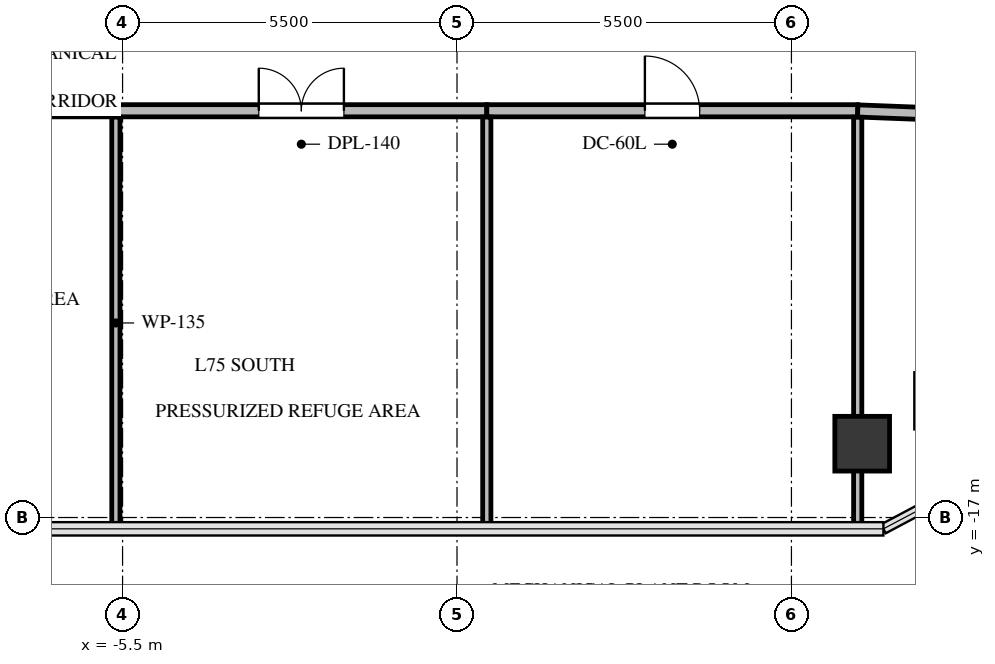
"""IFC4 building model, lengths in metres.
Left out: names, types, materials, properties, quantities, classifications, styles, units other than length and angle.
Written with IfcOpenShell. Run it as: python <this file> out.ifc"""

import sys

from ifc_helpers import new_model, si_unit, direction, frame, frame_2d, origin, origin_2d, place, context, subcontext, project, spatial, rectangle, extrude, source, transform, mapped, element, fill, save


model = new_model("IFC4")
c1 = context("Model", 3, precision=1e-05, world=origin(), true_north=direction((0.0, 1.0)))
c2 = subcontext(c1, "Body", "Model", "MODEL_VIEW")
j1 = project(units=[si_unit("LENGTHUNIT", "METRE"), si_unit("PLANEANGLEUNIT", "RADIAN")], contexts=[c1])
p1 = place(None, origin())
s1 = spatial("IfcSite", under=j1, at=p1, CompositionType="ELEMENT")
p2 = place(p1, origin())
s2 = spatial("IfcBuilding", under=s1, at=p2, CompositionType="ELEMENT")
p3 = place(p2, frame((0.0, 0.0, 268.3)))
s3 = spatial("IfcBuildingStorey", under=s2, at=p3, CompositionType="ELEMENT", Elevation=268.3)
m1 = source(origin(), c2, "Body", "SweptSolid", [
    extrude(rectangle(XDim=0.9, YDim=0.9, at=origin_2d()), origin(), (0.0, 0.0, 1.0), 4.05),
])
for number, where, z_axis, x_axis in (
    (1, (7.991, -15.081, -0.3), (0.0, 0.0, 1.0), (1.0, 0.0, 0.0)),
    (2, (6.664, -15.786, -0.3), (0.0, 0.0, 1.0), (1.0, 0.0, 0.0)),
):
    element("IfcColumn", number, at=place(p3, frame(where, z_axis=z_axis, x_axis=x_axis)), inside=s3, PredefinedType="COLUMN", context=c2, shape_type="MappedRepresentation", body=[
        mapped(m1, transform((0.0, 0.0, 0.0), x_axis=(1.0, 0.0, 0.0), y_axis=(0.0, 1.0, 0.0), z_axis=(0.0, 0.0, 1.0), scale=1.0)),
    ])
p4 = place(p3, frame((-12.39, -10.31, 0.0), z_axis=(0.0, 0.0, 1.0), x_axis=(1.0, 0.0, 0.0)))
e3 = element("IfcWall", 3, at=p4, inside=s3, PredefinedType="SOLIDWALL", context=c2, shape_type="SweptSolid", body=[
    extrude(rectangle(XDim=6.78, YDim=0.2, at=frame_2d((3.39, 0.0))), origin(), (0.0, 0.0, 1.0), 3.093),
])
p5 = place(p4, frame((0.35, 0.0, 0.0)))
e4 = element("IfcOpeningElement", 4, at=p5, cuts=e3, PredefinedType="OPENING", context=c2, shape_type="SweptSolid", body=[
    extrude(rectangle(XDim=1.4, YDim=2.15, at=frame_2d((0.7, 1.075))), frame((0.0, 0.11, 0.0), z_axis=(0.0, -1.0, 0.0), x_axis=(1.0, 0.0, 0.0)), (0.0, 0.0, 1.0), 0.22),
])
p6 = place(p3, frame((-5.61, -10.31, 0.0), z_axis=(0.0, 0.0, 1.0), x_axis=(1.0, 0.0, 0.0)))
e5 = element("IfcWall", 5, at=p6, inside=s3, PredefinedType="SOLIDWALL", context=c2, shape_type="SweptSolid", body=[
    extrude(rectangle(XDim=6.1, YDim=0.2, at=frame_2d((3.05, 0.0))), origin(), (0.0, 0.0, 1.0), 2.32),
])
p7 = place(p6, frame((2.35, 0.0, 0.0)))
e6 = element("IfcOpeningElement", 6, at=p7, cuts=e5, PredefinedType="OPENING", context=c2, shape_type="SweptSolid", body=[
    extrude(rectangle(XDim=1.4, YDim=2.15, at=frame_2d((0.7, 1.075))), frame((0.0, 0.11, 0.0), z_axis=(0.0, -1.0, 0.0), x_axis=(1.0, 0.0, 0.0)), (0.0, 0.0, 1.0), 0.22),
])
p8 = place(p3, frame((0.49, -10.31, 0.0), z_axis=(0.0, 0.0, 1.0), x_axis=(1.0, 0.0, 0.0)))
e7 = element("IfcWall", 7, at=p8, inside=s3, PredefinedType="SOLIDWALL", context=c2, shape_type="SweptSolid", body=[
    extrude(rectangle(XDim=6.1, YDim=0.2, at=frame_2d((3.05, 0.0))), origin(), (0.0, 0.0, 1.0), 2.32),
])
p9 = place(p8, frame((2.6, 0.0, 0.0)))
e8 = element("IfcOpeningElement", 8, at=p9, cuts=e7, PredefinedType="OPENING", context=c2, shape_type="SweptSolid", body=[
    extrude(rectangle(XDim=0.9, YDim=2.05, at=frame_2d((0.45, 1.025))), frame((0.0, 0.11, 0.0), z_axis=(0.0, -1.0, 0.0), x_axis=(1.0, 0.0, 0.0)), (0.0, 0.0, 1.0), 0.22),
])
p10 = place(p3, frame((6.59, -10.313, 0.0), z_axis=(0.0, 0.0, 1.0), x_axis=(0.999261994152, -0.038411808645, 0.0)))
e9 = element("IfcWall", 9, at=p10, inside=s3, PredefinedType="SOLIDWALL", context=c2, shape_type="SweptSolid", body=[
    extrude(rectangle(XDim=6.159, YDim=0.2, at=frame_2d((3.08, 0.0))), origin(), (0.0, 0.0, 1.0), 2.32),
])
p11 = place(p10, frame((2.629, 0.0, 0.0)))
e10 = element("IfcOpeningElement", 10, at=p11, cuts=e9, PredefinedType="OPENING", context=c2, shape_type="SweptSolid", body=[
    extrude(rectangle(XDim=0.9, YDim=2.05, at=frame_2d((0.45, 1.025))), frame((0.0, 0.11, 0.0), z_axis=(0.0, -1.0, 0.0), x_axis=(1.0, 0.0, 0.0)), (0.0, 0.0, 1.0), 0.22),
])
for number, where, z_axis, x_axis in (
    (11, (-5.61, -10.414, 0.0), (0.0, 0.0, 1.0), (0.0, -1.0, 0.0)),
    (12, (0.49, -10.414, 0.0), (0.0, 0.0, 1.0), (0.0, -1.0, 0.0)),
):
    element("IfcWall", number, at=place(p3, frame(where, z_axis=z_axis, x_axis=x_axis)), inside=s3, PredefinedType="PARTITIONING", context=c2, shape_type="SweptSolid", body=[
        extrude(rectangle(XDim=6.772, YDim=0.135, at=frame_2d((3.386, 0.0))), origin(), (0.0, 0.0, 1.0), 2.32),
    ])
p12 = place(p3, frame((6.59, -10.417, 0.0), z_axis=(0.0, 0.0, 1.0), x_axis=(0.0, -1.0, 0.0)))
e13 = element("IfcWall", 13, at=p12, inside=s3, PredefinedType="PARTITIONING", context=c2, shape_type="SweptSolid", body=[
    extrude(rectangle(XDim=6.769, YDim=0.135, at=frame_2d((3.384, 0.0))), origin(), (0.0, 0.0, 1.0), 2.32),
])
m2 = source(origin(), c2, "Body", "SweptSolid", [
    extrude(rectangle(XDim=1.4, YDim=2.15, at=frame_2d((0.7, 1.075))), frame((0.0, 0.025, 0.0), z_axis=(0.0, -1.0, 0.0), x_axis=(1.0, 0.0, 0.0)), (0.0, 0.0, 1.0), 0.05),
])
p13 = place(p7, origin())
e14 = element("IfcDoor", 14, at=p13, inside=s3, OperationType="DOUBLE_DOOR_SINGLE_SWING", PredefinedType="DOOR", context=c2, shape_type="MappedRepresentation", body=[
    mapped(m2, transform((0.0, 0.0, 0.0), x_axis=(1.0, 0.0, 0.0), y_axis=(0.0, 1.0, 0.0), z_axis=(0.0, 0.0, 1.0), scale=1.0)),
])
fill(e6, e14)
m3 = source(origin(), c2, "Body", "SweptSolid", [
    extrude(rectangle(XDim=0.9, YDim=2.05, at=frame_2d((0.45, 1.025))), frame((0.0, 0.025, 0.0), z_axis=(0.0, -1.0, 0.0), x_axis=(1.0, 0.0, 0.0)), (0.0, 0.0, 1.0), 0.05),
])
p14 = place(p9, origin())
e15 = element("IfcDoor", 15, at=p14, inside=s3, OperationType="SINGLE_SWING_LEFT", PredefinedType="DOOR", context=c2, shape_type="MappedRepresentation", body=[
    mapped(m3, transform((0.0, 0.0, 0.0), x_axis=(1.0, 0.0, 0.0), y_axis=(0.0, 1.0, 0.0), z_axis=(0.0, 0.0, 1.0), scale=1.0)),
])
fill(e8, e15)
save(model, sys.argv[1])
